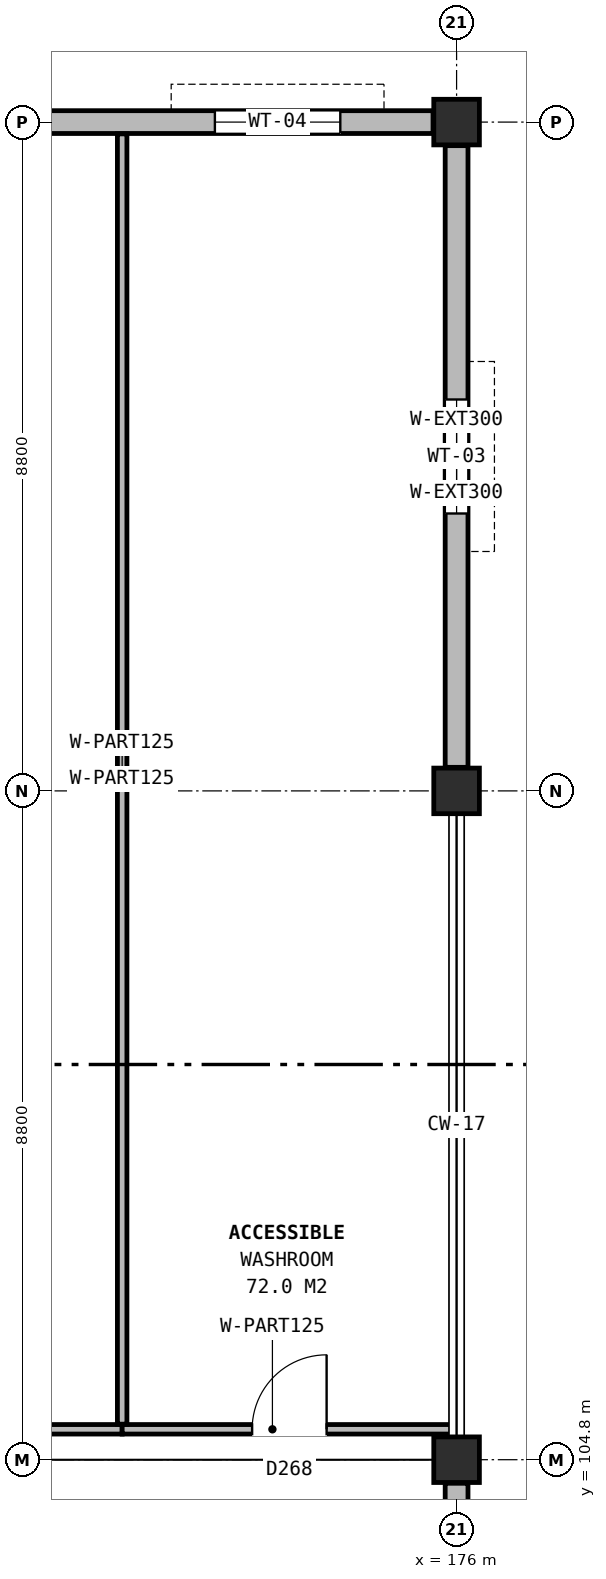
"""IFC4 building model, lengths in metres.
Left out: names, types, materials, properties, quantities, classifications, styles, units other than length and angle.
Written with IfcOpenShell. Run it as: python <this file> out.ifc"""

import sys

from ifc_helpers import new_model, si_unit, direction, frame, frame_2d, origin, origin_2d, place, context, subcontext, project, spatial, rectangle, extrude, element, fill, save


model = new_model("IFC4")
c1 = context("Model", 3, precision=1e-05, world=origin(), true_north=direction((0.0, 1.0)))
c2 = subcontext(c1, "Body", "Model", "MODEL_VIEW")
j1 = project(units=[si_unit("LENGTHUNIT", "METRE"), si_unit("PLANEANGLEUNIT", "RADIAN")], contexts=[c1])
p1 = place(None, origin())
s1 = spatial("IfcSite", under=j1, at=p1, CompositionType="ELEMENT")
p2 = place(p1, origin())
s2 = spatial("IfcBuilding", under=s1, at=p2, CompositionType="ELEMENT")
p3 = place(p2, frame((0.0, 0.0, 52.2)))
s3 = spatial("IfcBuildingStorey", under=s2, at=p3, CompositionType="ELEMENT", Elevation=52.2)
for number, where, z_axis, x_axis in (
    (1, (176.0, 104.8, 0.0), (0.0, 0.0, 1.0), (1.0, 0.0, 0.0)),
    (2, (176.0, 113.6, 0.0), (0.0, 0.0, 1.0), (1.0, 0.0, 0.0)),
    (3, (176.0, 122.4, 0.0), (0.0, 0.0, 1.0), (1.0, 0.0, 0.0)),
):
    element("IfcColumn", number, at=place(p3, frame(where, z_axis=z_axis, x_axis=x_axis)), inside=s3, PredefinedType="COLUMN", context=c2, shape_type="SweptSolid", body=[
        extrude(rectangle(XDim=0.6, YDim=0.6, at=origin_2d()), origin(), (0.0, 0.0, 1.0), 3.8),
    ])
p4 = place(p3, frame((176.0, 96.31, 0.0), z_axis=(0.0, 0.0, 1.0), x_axis=(0.0, 1.0, 0.0)))
e4 = element("IfcWall", 4, at=p4, inside=s3, PredefinedType="SOLIDWALL", context=c2, shape_type="SweptSolid", body=[
    extrude(rectangle(XDim=8.18, YDim=0.3, at=frame_2d((4.09, 0.0))), origin(), (0.0, 0.0, 1.0), 3.05),
])
p5 = place(p4, frame((2.37, 0.0, 0.9)))
e5 = element("IfcOpeningElement", 5, at=p5, cuts=e4, PredefinedType="OPENING", context=c2, shape_type="SweptSolid", body=[
    extrude(rectangle(XDim=1.35, YDim=1.8, at=frame_2d((0.675, 0.9))), frame((0.0, 0.16, 0.0), z_axis=(0.0, -1.0, 0.0), x_axis=(1.0, 0.0, 0.0)), (0.0, 0.0, 1.0), 0.32),
])
p6 = place(p3, frame((176.0, 113.91, 0.0), z_axis=(0.0, 0.0, 1.0), x_axis=(0.0, 1.0, 0.0)))
e6 = element("IfcWall", 6, at=p6, inside=s3, PredefinedType="SOLIDWALL", context=c2, shape_type="SweptSolid", body=[
    extrude(rectangle(XDim=8.18, YDim=0.3, at=frame_2d((4.09, 0.0))), origin(), (0.0, 0.0, 1.0), 3.05),
])
p7 = place(p6, frame((3.34, 0.0, 0.9)))
e7 = element("IfcOpeningElement", 7, at=p7, cuts=e6, PredefinedType="OPENING", context=c2, shape_type="SweptSolid", body=[
    extrude(rectangle(XDim=1.5, YDim=1.8, at=frame_2d((0.75, 0.9))), frame((0.0, 0.16, 0.0), z_axis=(0.0, -1.0, 0.0), x_axis=(1.0, 0.0, 0.0)), (0.0, 0.0, 1.0), 0.32),
])
p8 = place(p3, frame((175.69, 122.4, 0.0), z_axis=(0.0, 0.0, 1.0), x_axis=(-1.0, 0.0, 0.0)))
e8 = element("IfcWall", 8, at=p8, inside=s3, PredefinedType="SOLIDWALL", context=c2, shape_type="SweptSolid", body=[
    extrude(rectangle(XDim=7.78, YDim=0.3, at=frame_2d((3.89, 0.0))), origin(), (0.0, 0.0, 1.0), 3.05),
])
p9 = place(p8, frame((1.22, 0.0, 0.9)))
e9 = element("IfcOpeningElement", 9, at=p9, cuts=e8, PredefinedType="OPENING", context=c2, shape_type="SweptSolid", body=[
    extrude(rectangle(XDim=1.65, YDim=1.85, at=frame_2d((0.825, 0.925))), frame((0.0, 0.16, 0.0), z_axis=(0.0, -1.0, 0.0), x_axis=(1.0, 0.0, 0.0)), (0.0, 0.0, 1.0), 0.32),
])
p10 = place(p3, frame((167.355, 105.2, 0.0), z_axis=(0.0, 0.0, 1.0), x_axis=(1.0, 0.0, 0.0)))
e10 = element("IfcWall", 10, at=p10, inside=s3, PredefinedType="PARTITIONING", context=c2, shape_type="SweptSolid", body=[
    extrude(rectangle(XDim=4.245, YDim=0.125, at=frame_2d((2.123, 0.0))), origin(), (0.0, 0.0, 1.0), 3.045),
])
p11 = place(p10, frame((1.633, 0.0, 0.0)))
e11 = element("IfcOpeningElement", 11, at=p11, cuts=e10, PredefinedType="OPENING", context=c2, shape_type="SweptSolid", body=[
    extrude(rectangle(XDim=0.98, YDim=2.1, at=frame_2d((0.49, 1.05))), frame((0.0, 0.073, 0.0), z_axis=(0.0, -1.0, 0.0), x_axis=(1.0, 0.0, 0.0)), (0.0, 0.0, 1.0), 0.145),
])
p12 = place(p3, frame((171.6, 105.2, 0.0), z_axis=(0.0, 0.0, 1.0), x_axis=(1.0, 0.0, 0.0)))
e12 = element("IfcWall", 12, at=p12, inside=s3, PredefinedType="PARTITIONING", context=c2, shape_type="SweptSolid", body=[
    extrude(rectangle(XDim=4.4, YDim=0.125, at=frame_2d((2.2, 0.0))), origin(), (0.0, 0.0, 1.0), 3.045),
])
p13 = place(p12, frame((1.71, 0.0, 0.0)))
e13 = element("IfcOpeningElement", 13, at=p13, cuts=e12, PredefinedType="OPENING", context=c2, shape_type="SweptSolid", body=[
    extrude(rectangle(XDim=0.98, YDim=2.1, at=frame_2d((0.49, 1.05))), frame((0.0, 0.073, 0.0), z_axis=(0.0, -1.0, 0.0), x_axis=(1.0, 0.0, 0.0)), (0.0, 0.0, 1.0), 0.145),
])
p14 = place(p3, frame((171.6, 105.268, 0.0), z_axis=(0.0, 0.0, 1.0), x_axis=(0.0, 1.0, 0.0)))
e14 = element("IfcWall", 14, at=p14, inside=s3, PredefinedType="PARTITIONING", context=c2, shape_type="SweptSolid", body=[
    extrude(rectangle(XDim=16.978, YDim=0.125, at=frame_2d((8.489, 0.0))), origin(), (0.0, 0.0, 1.0), 3.465),
])
p15 = place(p7, origin())
e15 = element("IfcWindow", 15, at=p15, inside=s3, PartitioningType="SINGLE_PANEL", PredefinedType="WINDOW", context=c2, shape_type="SweptSolid", body=[
    extrude(rectangle(XDim=1.5, YDim=1.8, at=frame_2d((0.75, 0.9))), frame((0.0, 0.03, 0.0), z_axis=(0.0, -1.0, 0.0), x_axis=(1.0, 0.0, 0.0)), (0.0, 0.0, 1.0), 0.06),
])
fill(e7, e15)
p16 = place(p9, origin())
e16 = element("IfcWindow", 16, at=p16, inside=s3, PartitioningType="SINGLE_PANEL", PredefinedType="WINDOW", context=c2, shape_type="SweptSolid", body=[
    extrude(rectangle(XDim=1.65, YDim=1.85, at=frame_2d((0.825, 0.925))), frame((0.0, 0.03, 0.0), z_axis=(0.0, -1.0, 0.0), x_axis=(1.0, 0.0, 0.0)), (0.0, 0.0, 1.0), 0.06),
])
fill(e9, e16)
p17 = place(p13, origin())
e17 = element("IfcDoor", 17, at=p17, inside=s3, OperationType="SINGLE_SWING_RIGHT", PredefinedType="DOOR", context=c2, shape_type="SweptSolid", body=[
    extrude(rectangle(XDim=0.98, YDim=2.1, at=frame_2d((0.49, 1.05))), frame((0.0, 0.025, 0.0), z_axis=(0.0, -1.0, 0.0), x_axis=(1.0, 0.0, 0.0)), (0.0, 0.0, 1.0), 0.05),
])
fill(e13, e17)
save(model, sys.argv[1])
